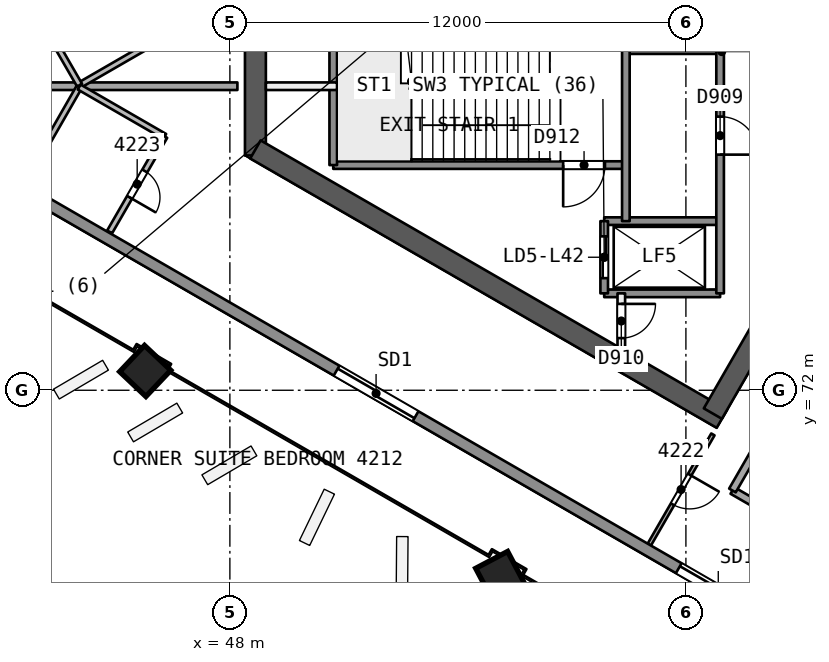
"""IFC4 building model, lengths in metres.
Left out: names, types, materials, properties, quantities, classifications, styles, units other than length and angle.
Written with IfcOpenShell. Run it as: python <this file> out.ifc"""

import sys

from ifc_helpers import new_model, si_unit, direction, frame, frame_2d, origin, origin_2d, place, context, subcontext, project, spatial, rectangle, extrude, element, fill, save


model = new_model("IFC4")
c1 = context("Model", 3, precision=1e-05, world=origin(), true_north=direction((0.0, 1.0)))
c2 = subcontext(c1, "Body", "Model", "MODEL_VIEW")
j1 = project(units=[si_unit("LENGTHUNIT", "METRE"), si_unit("PLANEANGLEUNIT", "RADIAN")], contexts=[c1])
p1 = place(None, origin())
s1 = spatial("IfcSite", under=j1, at=p1, CompositionType="ELEMENT")
p2 = place(p1, origin())
s2 = spatial("IfcBuilding", under=s1, at=p2, CompositionType="ELEMENT")
p3 = place(p2, frame((0.0, 0.0, 174.8)))
s3 = spatial("IfcBuildingStorey", under=s2, at=p3, CompositionType="ELEMENT", Elevation=174.8)
p4 = place(p3, frame((65.682, 80.0, 0.0), z_axis=(0.0, 0.0, 1.0), x_axis=(-0.500000202252, 0.866025287014, 0.0)))
e1 = element("IfcWall", 1, at=p4, inside=s3, PredefinedType="SHEAR", context=c2, shape_type="SweptSolid", body=[
    extrude(rectangle(XDim=10.221, YDim=0.55, at=frame_2d((5.111, 0.0))), origin(), (0.0, 0.0, 1.0), 3.7),
])
p5 = place(p4, frame((0.791, 0.0, 0.0)))
e2 = element("IfcOpeningElement", 2, at=p5, cuts=e1, PredefinedType="OPENING", context=c2, shape_type="SweptSolid", body=[
    extrude(rectangle(XDim=1.2, YDim=2.1, at=frame_2d((0.6, 1.05))), frame((0.0, 0.286, 0.0), z_axis=(0.0, -1.0, 0.0), x_axis=(1.0, 0.0, 0.0)), (0.0, 0.0, 1.0), 0.571),
])
p6 = place(p3, frame((48.672, 81.664, 0.0), z_axis=(0.0, 0.0, 1.0), x_axis=(0.0, -1.0, 0.0)))
e3 = element("IfcWall", 3, at=p6, inside=s3, PredefinedType="SHEAR", context=c2, shape_type="SweptSolid", body=[
    extrude(rectangle(XDim=3.487, YDim=0.55, at=frame_2d((1.743, 0.0))), origin(), (0.0, 0.0, 1.0), 3.7),
])
p7 = place(p3, frame((48.672, 78.336, 0.0), z_axis=(0.0, 0.0, 1.0), x_axis=(0.866023530946, -0.500003243837, 0.0)))
e4 = element("IfcWall", 4, at=p7, inside=s3, PredefinedType="SHEAR", context=c2, shape_type="SweptSolid", body=[
    extrude(rectangle(XDim=14.175, YDim=0.55, at=frame_2d((7.087, 0.0))), origin(), (0.0, 0.0, 1.0), 3.7),
])
p8 = place(p3, frame((60.709, 71.386, 0.0), z_axis=(0.0, 0.0, 1.0), x_axis=(0.500015938302, 0.866016201606, 0.0)))
e5 = element("IfcWall", 5, at=p8, inside=s3, PredefinedType="SHEAR", context=c2, shape_type="SweptSolid", body=[
    extrude(rectangle(XDim=10.105, YDim=0.55, at=frame_2d((5.053, 0.0))), origin(), (0.0, 0.0, 1.0), 3.7),
])
p9 = place(p8, frame((7.955, 0.0, 0.0)))
e6 = element("IfcOpeningElement", 6, at=p9, cuts=e5, PredefinedType="OPENING", context=c2, shape_type="SweptSolid", body=[
    extrude(rectangle(XDim=1.2, YDim=2.1, at=frame_2d((0.6, 1.05))), frame((0.0, 0.286, 0.0), z_axis=(0.0, -1.0, 0.0), x_axis=(1.0, 0.0, 0.0)), (0.0, 0.0, 1.0), 0.571),
])
p10 = place(p3, frame((45.738, 72.5, 0.0), z_axis=(0.028559101991, 0.006859460986, 0.999568569678), x_axis=(-0.866410384874, 0.498876768373, 0.021331079692)))
e7 = element("IfcColumn", 7, at=p10, inside=s3, PredefinedType="COLUMN", context=c2, shape_type="SweptSolid", body=[
    extrude(rectangle(XDim=0.95, YDim=0.95, at=origin_2d()), origin(), (0.0, 0.0, 1.0), 3.702),
])
p11 = place(p3, frame((55.087, 67.102, 0.0), z_axis=(0.019328516974, 0.012138044789, 0.999739504221), x_axis=(-0.865685889808, 0.500474070789, 0.010660424724)))
e8 = element("IfcColumn", 8, at=p11, inside=s3, PredefinedType="COLUMN", context=c2, shape_type="SweptSolid", body=[
    extrude(rectangle(XDim=0.95, YDim=0.95, at=origin_2d()), origin(), (0.0, 0.0, 1.0), 3.701),
])
p12 = place(p3, frame((46.296, 81.328, 0.0), z_axis=(0.0, 0.0, 1.0), x_axis=(-0.866021400173, -0.500006934395, 0.0)))
e9 = element("IfcWall", 9, at=p12, inside=s3, PredefinedType="PARTITIONING", context=c2, shape_type="SweptSolid", body=[
    extrude(rectangle(XDim=2.6, YDim=0.15, at=frame_2d((1.3, 0.0))), origin(), (0.0, 0.0, 1.0), 3.25),
])
p13 = place(p3, frame((44.045, 80.028, 0.0), z_axis=(0.0, 0.0, 1.0), x_axis=(-0.499960702874, 0.866048090802, 0.0)))
e10 = element("IfcWall", 10, at=p13, inside=s3, PredefinedType="PARTITIONING", context=c2, shape_type="SweptSolid", body=[
    extrude(rectangle(XDim=2.632, YDim=0.15, at=frame_2d((1.316, 0.0))), origin(), (0.0, 0.0, 1.0), 3.25),
])
p14 = place(p3, frame((42.729, 80.0, 0.0), z_axis=(0.0, 0.0, 1.0), x_axis=(1.0, 0.0, 0.0)))
e11 = element("IfcWall", 11, at=p14, inside=s3, PredefinedType="PARTITIONING", context=c2, shape_type="SweptSolid", body=[
    extrude(rectangle(XDim=5.469, YDim=0.2, at=frame_2d((2.734, 0.0))), origin(), (0.0, 0.0, 1.0), 3.25),
])
p15 = place(p3, frame((60.71, 70.838, 0.0), z_axis=(0.0, 0.0, 1.0), x_axis=(-0.499981198768, -0.866036258409, 0.0)))
e12 = element("IfcWall", 12, at=p15, inside=s3, PredefinedType="PARTITIONING", context=c2, shape_type="SweptSolid", body=[
    extrude(rectangle(XDim=3.349, YDim=0.1, at=frame_2d((1.674, 0.0))), origin(), (0.0, 0.0, 1.0), 3.25),
])
p16 = place(p15, frame((1.224, 0.0, 0.0)))
e13 = element("IfcOpeningElement", 13, at=p16, cuts=e12, PredefinedType="OPENING", context=c2, shape_type="SweptSolid", body=[
    extrude(rectangle(XDim=0.9, YDim=2.1, at=frame_2d((0.45, 1.05))), frame((0.0, 0.061, 0.0), z_axis=(0.0, -1.0, 0.0), x_axis=(1.0, 0.0, 0.0)), (0.0, 0.0, 1.0), 0.121),
])
p17 = place(p3, frame((62.956, 68.363, 0.0), z_axis=(0.0, 0.0, 1.0), x_axis=(-0.866041268327, 0.499972520799, 0.0)))
e14 = element("IfcWall", 14, at=p17, inside=s3, PredefinedType="PARTITIONING", context=c2, shape_type="SweptSolid", body=[
    extrude(rectangle(XDim=2.0, YDim=0.2, at=frame_2d((1.0, 0.0))), origin(), (0.0, 0.0, 1.0), 3.25),
])
p18 = place(p3, frame((61.224, 69.363, 0.0), z_axis=(0.0, 0.0, 1.0), x_axis=(0.499990139034, 0.866031096941, 0.0)))
e15 = element("IfcWall", 15, at=p18, inside=s3, PredefinedType="PARTITIONING", context=c2, shape_type="SweptSolid", body=[
    extrude(rectangle(XDim=9.0, YDim=0.2, at=frame_2d((4.5, 0.0))), origin(), (0.0, 0.0, 1.0), 3.25),
])
p19 = place(p3, frame((42.729, 77.7, 0.0), z_axis=(0.0, 0.0, 1.0), x_axis=(0.497120014637, 0.867681791354, 0.0)))
e16 = element("IfcWall", 16, at=p19, inside=s3, PredefinedType="PARTITIONING", context=c2, shape_type="SweptSolid", body=[
    extrude(rectangle(XDim=2.625, YDim=0.15, at=frame_2d((1.313, 0.0))), origin(), (0.0, 0.0, 1.0), 3.25),
])
p20 = place(p3, frame((44.034, 79.979, 0.0), z_axis=(0.0, 0.0, 1.0), x_axis=(0.866021400173, -0.500006934395, 0.0)))
e17 = element("IfcWall", 17, at=p20, inside=s3, PredefinedType="PARTITIONING", context=c2, shape_type="SweptSolid", body=[
    extrude(rectangle(XDim=2.6, YDim=0.15, at=frame_2d((1.3, 0.0))), origin(), (0.0, 0.0, 1.0), 3.25),
])
p21 = place(p3, frame((46.286, 78.678, 0.0), z_axis=(0.0, 0.0, 1.0), x_axis=(-0.50005036918, -0.865996321171, 0.0)))
e18 = element("IfcWall", 18, at=p21, inside=s3, PredefinedType="PARTITIONING", context=c2, shape_type="SweptSolid", body=[
    extrude(rectangle(XDim=2.9, YDim=0.15, at=frame_2d((1.45, 0.0))), origin(), (0.0, 0.0, 1.0), 3.25),
])
p22 = place(p21, frame((1.05, 0.0, 0.0)))
e19 = element("IfcOpeningElement", 19, at=p22, cuts=e18, PredefinedType="OPENING", context=c2, shape_type="SweptSolid", body=[
    extrude(rectangle(XDim=0.8, YDim=2.1, at=frame_2d((0.4, 1.05))), frame((0.0, 0.085, 0.0), z_axis=(0.0, -1.0, 0.0), x_axis=(1.0, 0.0, 0.0)), (0.0, 0.0, 1.0), 0.171),
])
p23 = place(p3, frame((88.844, 50.557, 0.0), z_axis=(0.0, 0.0, 1.0), x_axis=(-0.866025382531, 0.500000036812, 0.0)))
e20 = element("IfcWall", 20, at=p23, inside=s3, PredefinedType="SOLIDWALL", context=c2, shape_type="SweptSolid", body=[
    extrude(rectangle(XDim=53.42, YDim=0.3, at=frame_2d((26.71, 0.0))), origin(), (0.0, 0.0, 1.0), 3.25),
])
p24 = place(p23, frame((31.122, 0.0, 0.0)))
e21 = element("IfcOpeningElement", 21, at=p24, cuts=e20, PredefinedType="OPENING", context=c2, shape_type="SweptSolid", body=[
    extrude(rectangle(XDim=2.4, YDim=2.4, at=frame_2d((1.2, 1.2))), frame((0.0, 0.161, 0.0), z_axis=(0.0, -1.0, 0.0), x_axis=(1.0, 0.0, 0.0)), (0.0, 0.0, 1.0), 0.321),
])
p25 = place(p23, frame((41.52, 0.0, 0.0)))
e22 = element("IfcOpeningElement", 22, at=p25, cuts=e20, PredefinedType="OPENING", context=c2, shape_type="SweptSolid", body=[
    extrude(rectangle(XDim=2.4, YDim=2.4, at=frame_2d((1.2, 1.2))), frame((0.0, 0.161, 0.0), z_axis=(0.0, -1.0, 0.0), x_axis=(1.0, 0.0, 0.0)), (0.0, 0.0, 1.0), 0.321),
])
p26 = place(p23, frame((20.834, 0.0, 0.0)))
e23 = element("IfcOpeningElement", 23, at=p26, cuts=e20, PredefinedType="OPENING", context=c2, shape_type="SweptSolid", body=[
    extrude(rectangle(XDim=2.4, YDim=2.4, at=frame_2d((1.2, 1.2))), frame((0.0, 0.161, 0.0), z_axis=(0.0, -1.0, 0.0), x_axis=(1.0, 0.0, 0.0)), (0.0, 0.0, 1.0), 0.321),
])
p27 = place(p23, frame((9.507, 0.0, 0.0)))
e24 = element("IfcOpeningElement", 24, at=p27, cuts=e20, PredefinedType="OPENING", context=c2, shape_type="SweptSolid", body=[
    extrude(rectangle(XDim=2.4, YDim=2.4, at=frame_2d((1.2, 1.2))), frame((0.0, 0.161, 0.0), z_axis=(0.0, -1.0, 0.0), x_axis=(1.0, 0.0, 0.0)), (0.0, 0.0, 1.0), 0.321),
])
p28 = place(p23, frame((26.446, 0.0, 0.0)))
e25 = element("IfcOpeningElement", 25, at=p28, cuts=e20, PredefinedType="OPENING", context=c2, shape_type="SweptSolid", body=[
    extrude(rectangle(XDim=2.4, YDim=2.4, at=frame_2d((1.2, 1.2))), frame((0.0, 0.161, 0.0), z_axis=(0.0, -1.0, 0.0), x_axis=(1.0, 0.0, 0.0)), (0.0, 0.0, 1.0), 0.321),
])
p29 = place(p3, frame((60.9, 80.95, 0.0), z_axis=(0.0, 0.0, 1.0), x_axis=(-1.0, 0.0, 0.0)))
e26 = element("IfcWall", 26, at=p29, inside=s3, PredefinedType="SOLIDWALL", context=c2, shape_type="SweptSolid", body=[
    extrude(rectangle(XDim=2.48, YDim=0.2, at=frame_2d((1.24, 0.0))), origin(), (0.0, 0.0, 1.0), 3.25),
])
p30 = place(p3, frame((50.82, 80.0, 0.0), z_axis=(0.0, 0.0, 1.0), x_axis=(-1.0, 0.0, 0.0)))
e27 = element("IfcWall", 27, at=p30, inside=s3, PredefinedType="PARTITIONING", context=c2, shape_type="SweptSolid", body=[
    extrude(rectangle(XDim=1.873, YDim=0.2, at=frame_2d((0.937, 0.0))), origin(), (0.0, 0.0, 1.0), 3.25),
])
p31 = place(p3, frame((58.42, 77.925, 0.0), z_axis=(0.0, 0.0, 1.0), x_axis=(-1.0, 0.0, 0.0)))
e28 = element("IfcWall", 28, at=p31, inside=s3, PredefinedType="SOLIDWALL", context=c2, shape_type="SweptSolid", body=[
    extrude(rectangle(XDim=7.7, YDim=0.2, at=frame_2d((3.85, 0.0))), origin(), (0.0, 0.0, 1.0), 3.25),
])
p32 = place(p31, frame((0.55, 0.0, 0.0)))
e29 = element("IfcOpeningElement", 29, at=p32, cuts=e28, PredefinedType="OPENING", context=c2, shape_type="SweptSolid", body=[
    extrude(rectangle(XDim=1.1, YDim=2.1, at=frame_2d((0.55, 1.05))), frame((0.0, 0.11, 0.0), z_axis=(0.0, -1.0, 0.0), x_axis=(1.0, 0.0, 0.0)), (0.0, 0.0, 1.0), 0.221),
])
for number, where, z_axis, x_axis in (
    (30, (60.9, 76.45, 0.0), (0.0, 0.0, 1.0), (-1.0, 0.0, 0.0)),
    (31, (60.9, 74.55, 0.0), (0.0, 0.0, 1.0), (-1.0, 0.0, 0.0)),
):
    element("IfcWall", number, at=place(p3, frame(where, z_axis=z_axis, x_axis=x_axis)), inside=s3, PredefinedType="SOLIDWALL", context=c2, shape_type="SweptSolid", body=[
        extrude(rectangle(XDim=3.05, YDim=0.2, at=frame_2d((1.525, 0.0))), origin(), (0.0, 0.0, 1.0), 3.25),
    ])
p33 = place(p3, frame((60.9, 85.45, 0.0), z_axis=(0.0, 0.0, 1.0), x_axis=(0.0, -1.0, 0.0)))
e32 = element("IfcWall", 32, at=p33, inside=s3, PredefinedType="SOLIDWALL", context=c2, shape_type="SweptSolid", body=[
    extrude(rectangle(XDim=10.9, YDim=0.2, at=frame_2d((5.45, 0.0))), origin(), (0.0, 0.0, 1.0), 3.25),
])
p34 = place(p33, frame((0.625, 0.0, 0.0)))
e33 = element("IfcOpeningElement", 33, at=p34, cuts=e32, PredefinedType="OPENING", context=c2, shape_type="SweptSolid", body=[
    extrude(rectangle(XDim=1.0, YDim=2.1, at=frame_2d((0.5, 1.05))), frame((0.0, 0.11, 0.0), z_axis=(0.0, -1.0, 0.0), x_axis=(1.0, 0.0, 0.0)), (0.0, 0.0, 1.0), 0.221),
])
p35 = place(p33, frame((2.875, 0.0, 0.0)))
e34 = element("IfcOpeningElement", 34, at=p35, cuts=e32, PredefinedType="OPENING", context=c2, shape_type="SweptSolid", body=[
    extrude(rectangle(XDim=1.0, YDim=2.1, at=frame_2d((0.5, 1.05))), frame((0.0, 0.11, 0.0), z_axis=(0.0, -1.0, 0.0), x_axis=(1.0, 0.0, 0.0)), (0.0, 0.0, 1.0), 0.221),
])
p36 = place(p33, frame((6.25, 0.0, 0.0)))
e35 = element("IfcOpeningElement", 35, at=p36, cuts=e32, PredefinedType="OPENING", context=c2, shape_type="SweptSolid", body=[
    extrude(rectangle(XDim=1.0, YDim=2.1, at=frame_2d((0.5, 1.05))), frame((0.0, 0.11, 0.0), z_axis=(0.0, -1.0, 0.0), x_axis=(1.0, 0.0, 0.0)), (0.0, 0.0, 1.0), 0.221),
])
p37 = place(p3, frame((58.42, 86.974, 0.0), z_axis=(0.0, 0.0, 1.0), x_axis=(0.0, -1.0, 0.0)))
e36 = element("IfcWall", 36, at=p37, inside=s3, PredefinedType="SOLIDWALL", context=c2, shape_type="SweptSolid", body=[
    extrude(rectangle(XDim=10.524, YDim=0.2, at=frame_2d((5.262, 0.0))), origin(), (0.0, 0.0, 1.0), 3.25),
])
p38 = place(p37, frame((0.312, 0.0, 0.0)))
e37 = element("IfcOpeningElement", 37, at=p38, cuts=e36, PredefinedType="OPENING", context=c2, shape_type="SweptSolid", body=[
    extrude(rectangle(XDim=0.9, YDim=2.1, at=frame_2d((0.45, 1.05))), frame((0.0, 0.11, 0.0), z_axis=(0.0, -1.0, 0.0), x_axis=(1.0, 0.0, 0.0)), (0.0, 0.0, 1.0), 0.221),
])
p39 = place(p3, frame((58.3, 74.55, 0.0), z_axis=(0.0, 0.0, 1.0), x_axis=(0.0, -1.0, 0.0)))
e38 = element("IfcWall", 38, at=p39, inside=s3, PredefinedType="PARTITIONING", context=c2, shape_type="SweptSolid", body=[
    extrude(rectangle(XDim=1.455, YDim=0.2, at=frame_2d((0.728, 0.0))), origin(), (0.0, 0.0, 1.0), 3.25),
])
p40 = place(p39, frame((0.278, 0.0, 0.0)))
e39 = element("IfcOpeningElement", 39, at=p40, cuts=e38, PredefinedType="OPENING", context=c2, shape_type="SweptSolid", body=[
    extrude(rectangle(XDim=0.9, YDim=2.1, at=frame_2d((0.45, 1.05))), frame((0.0, 0.11, 0.0), z_axis=(0.0, -1.0, 0.0), x_axis=(1.0, 0.0, 0.0)), (0.0, 0.0, 1.0), 0.221),
])
p41 = place(p3, frame((57.85, 76.45, 0.0), z_axis=(0.0, 0.0, 1.0), x_axis=(0.0, -1.0, 0.0)))
e40 = element("IfcWall", 40, at=p41, inside=s3, PredefinedType="SOLIDWALL", context=c2, shape_type="SweptSolid", body=[
    extrude(rectangle(XDim=1.9, YDim=0.2, at=frame_2d((0.95, 0.0))), origin(), (0.0, 0.0, 1.0), 3.25),
])
p42 = place(p41, frame((0.4, 0.0, 0.0)))
e41 = element("IfcOpeningElement", 41, at=p42, cuts=e40, PredefinedType="OPENING", context=c2, shape_type="SweptSolid", body=[
    extrude(rectangle(XDim=1.1, YDim=2.1, at=frame_2d((0.55, 1.05))), frame((0.0, 0.11, 0.0), z_axis=(0.0, -1.0, 0.0), x_axis=(1.0, 0.0, 0.0)), (0.0, 0.0, 1.0), 0.221),
])
p43 = place(p3, frame((50.72, 82.075, 0.0), z_axis=(0.0, 0.0, 1.0), x_axis=(0.0, -1.0, 0.0)))
e42 = element("IfcWall", 42, at=p43, inside=s3, PredefinedType="SOLIDWALL", context=c2, shape_type="SweptSolid", body=[
    extrude(rectangle(XDim=4.15, YDim=0.2, at=frame_2d((2.075, 0.0))), origin(), (0.0, 0.0, 1.0), 3.25),
])
p44 = place(p16, origin())
e43 = element("IfcDoor", 43, at=p44, inside=s3, OperationType="SINGLE_SWING_LEFT", PredefinedType="NOTDEFINED", context=c2, shape_type="SweptSolid", body=[
    extrude(rectangle(XDim=0.9, YDim=2.1, at=frame_2d((0.45, 1.05))), frame((0.0, 0.025, 0.0), z_axis=(0.0, -1.0, 0.0), x_axis=(1.0, 0.0, 0.0)), (0.0, 0.0, 1.0), 0.05),
])
fill(e13, e43)
p45 = place(p22, origin())
e44 = element("IfcDoor", 44, at=p45, inside=s3, OperationType="SINGLE_SWING_RIGHT", PredefinedType="NOTDEFINED", context=c2, shape_type="SweptSolid", body=[
    extrude(rectangle(XDim=0.8, YDim=2.1, at=frame_2d((0.4, 1.05))), frame((0.0, 0.025, 0.0), z_axis=(0.0, -1.0, 0.0), x_axis=(1.0, 0.0, 0.0)), (0.0, 0.0, 1.0), 0.05),
])
fill(e19, e44)
p46 = place(p24, origin())
e45 = element("IfcDoor", 45, at=p46, inside=s3, OperationType="SLIDING_TO_LEFT", PredefinedType="NOTDEFINED", context=c2, shape_type="SweptSolid", body=[
    extrude(rectangle(XDim=2.4, YDim=2.4, at=frame_2d((1.2, 1.2))), frame((0.0, 0.025, 0.0), z_axis=(0.0, -1.0, 0.0), x_axis=(1.0, 0.0, 0.0)), (0.0, 0.0, 1.0), 0.05),
])
fill(e21, e45)
p47 = place(p25, origin())
e46 = element("IfcDoor", 46, at=p47, inside=s3, OperationType="SLIDING_TO_RIGHT", PredefinedType="NOTDEFINED", context=c2, shape_type="SweptSolid", body=[
    extrude(rectangle(XDim=2.4, YDim=2.4, at=frame_2d((1.2, 1.2))), frame((0.0, 0.025, 0.0), z_axis=(0.0, -1.0, 0.0), x_axis=(1.0, 0.0, 0.0)), (0.0, 0.0, 1.0), 0.05),
])
fill(e22, e46)
p48 = place(p42, origin())
e47 = element("IfcDoor", 47, at=p48, inside=s3, OperationType="SLIDING_TO_RIGHT", PredefinedType="NOTDEFINED", context=c2, shape_type="SweptSolid", body=[
    extrude(rectangle(XDim=1.1, YDim=2.1, at=frame_2d((0.55, 1.05))), frame((0.0, 0.025, 0.0), z_axis=(0.0, -1.0, 0.0), x_axis=(1.0, 0.0, 0.0)), (0.0, 0.0, 1.0), 0.05),
])
fill(e41, e47)
p49 = place(p36, origin())
e48 = element("IfcDoor", 48, at=p49, inside=s3, OperationType="SINGLE_SWING_RIGHT", PredefinedType="NOTDEFINED", context=c2, shape_type="SweptSolid", body=[
    extrude(rectangle(XDim=1.0, YDim=2.1, at=frame_2d((0.5, 1.05))), frame((0.0, 0.025, 0.0), z_axis=(0.0, -1.0, 0.0), x_axis=(1.0, 0.0, 0.0)), (0.0, 0.0, 1.0), 0.05),
])
fill(e35, e48)
p50 = place(p40, origin())
e49 = element("IfcDoor", 49, at=p50, inside=s3, OperationType="SINGLE_SWING_LEFT", PredefinedType="NOTDEFINED", context=c2, shape_type="SweptSolid", body=[
    extrude(rectangle(XDim=0.9, YDim=2.1, at=frame_2d((0.45, 1.05))), frame((0.0, 0.025, 0.0), z_axis=(0.0, -1.0, 0.0), x_axis=(1.0, 0.0, 0.0)), (0.0, 0.0, 1.0), 0.05),
])
fill(e39, e49)
p51 = place(p32, origin())
e50 = element("IfcDoor", 50, at=p51, inside=s3, OperationType="SINGLE_SWING_RIGHT", PredefinedType="NOTDEFINED", context=c2, shape_type="SweptSolid", body=[
    extrude(rectangle(XDim=1.1, YDim=2.1, at=frame_2d((0.55, 1.05))), frame((0.0, 0.025, 0.0), z_axis=(0.0, -1.0, 0.0), x_axis=(1.0, 0.0, 0.0)), (0.0, 0.0, 1.0), 0.05),
])
fill(e29, e50)
save(model, sys.argv[1])
